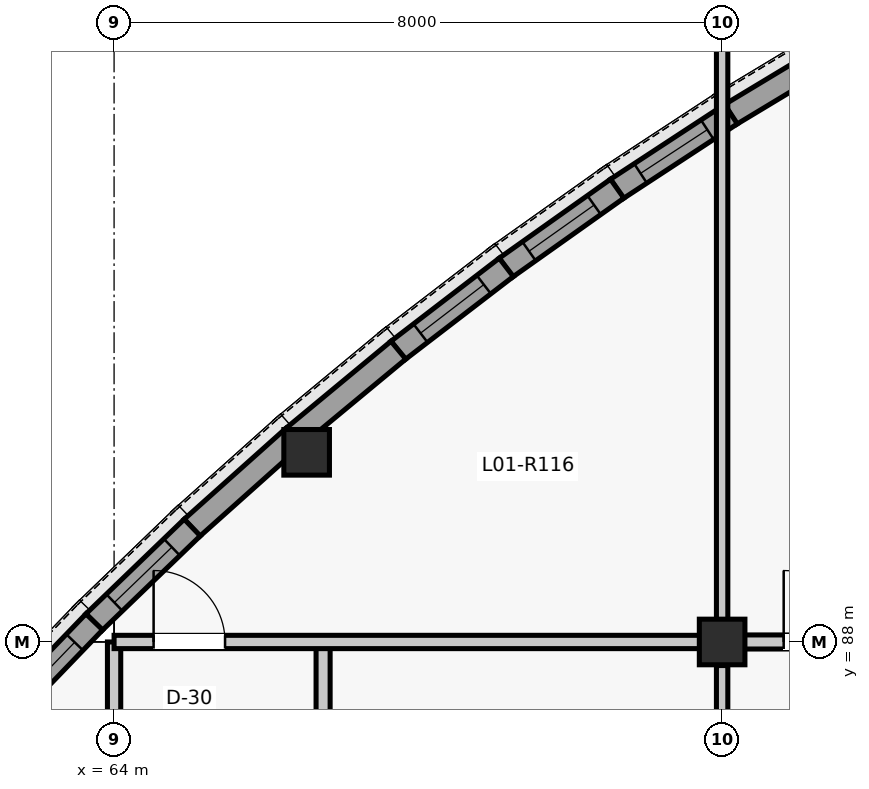
"""IFC4 building model, lengths in metres.
Left out: names, types, materials, properties, quantities, classifications, styles, units other than length and angle.
Written with IfcOpenShell. Run it as: python <this file> out.ifc"""

import sys

from ifc_helpers import new_model, si_unit, direction, frame, frame_2d, origin, origin_2d, place, context, subcontext, project, spatial, rectangle, extrude, element, fill, save


model = new_model("IFC4")
c1 = context("Model", 3, precision=1e-05, world=origin(), true_north=direction((0.0, 1.0)))
c2 = subcontext(c1, "Body", "Model", "MODEL_VIEW")
j1 = project(units=[si_unit("LENGTHUNIT", "METRE"), si_unit("PLANEANGLEUNIT", "RADIAN")], contexts=[c1])
p1 = place(None, origin())
s1 = spatial("IfcSite", under=j1, at=p1, CompositionType="ELEMENT")
p2 = place(p1, origin())
s2 = spatial("IfcBuilding", under=s1, at=p2, CompositionType="ELEMENT")
p3 = place(p2, frame((0.0, 0.0, 5.28)))
s3 = spatial("IfcBuildingStorey", under=s2, at=p3, CompositionType="ELEMENT", Elevation=5.28)
for number, where, z_axis, x_axis in (
    (1, (72.0, 88.0, 0.0), (0.0, 0.0, 1.0), (1.0, 0.0, 0.0)),
    (2, (66.533, 90.495, 0.0), (0.0, 0.0, 1.0), (1.0, 0.0, 0.0)),
):
    element("IfcColumn", number, at=place(p3, frame(where, z_axis=z_axis, x_axis=x_axis)), inside=s3, PredefinedType="COLUMN", context=c2, shape_type="SweptSolid", body=[
        extrude(rectangle(XDim=0.6, YDim=0.6, at=origin_2d()), origin(), (0.0, 0.0, 1.0), 4.62),
    ])
p4 = place(p3, frame((73.649, 95.867, 0.0), z_axis=(0.0, 0.0, 1.0), x_axis=(-0.856543302071, -0.51607516088, 0.0)))
e3 = element("IfcWall", 3, at=p4, inside=s3, PredefinedType="SOLIDWALL", context=c2, shape_type="SweptSolid", body=[
    extrude(rectangle(XDim=1.795, YDim=0.305, at=frame_2d((0.897, 0.0))), origin(), (0.0, 0.0, 1.0), 4.335),
])
p5 = place(p3, frame((72.117, 94.944, 0.0), z_axis=(0.0, 0.0, 1.0), x_axis=(-0.836686786408, -0.547681678944, 0.0)))
e4 = element("IfcWall", 4, at=p5, inside=s3, PredefinedType="SOLIDWALL", context=c2, shape_type="SweptSolid", body=[
    extrude(rectangle(XDim=1.795, YDim=0.305, at=frame_2d((0.897, 0.0))), origin(), (0.0, 0.0, 1.0), 4.335),
])
p6 = place(p5, frame((0.373, 0.0, 0.9)))
e5 = element("IfcOpeningElement", 5, at=p6, cuts=e4, PredefinedType="OPENING", context=c2, shape_type="SweptSolid", body=[
    extrude(rectangle(XDim=1.05, YDim=1.85, at=frame_2d((0.525, 0.925))), frame((0.0, 0.162, 0.0), z_axis=(0.0, -1.0, 0.0), x_axis=(1.0, 0.0, 0.0)), (0.0, 0.0, 1.0), 0.325),
])
p7 = place(p3, frame((70.62, 93.964, 0.0), z_axis=(0.0, 0.0, 1.0), x_axis=(-0.815567185578, -0.578662393636, 0.0)))
e6 = element("IfcWall", 6, at=p7, inside=s3, PredefinedType="SOLIDWALL", context=c2, shape_type="SweptSolid", body=[
    extrude(rectangle(XDim=1.795, YDim=0.305, at=frame_2d((0.897, 0.0))), origin(), (0.0, 0.0, 1.0), 4.335),
])
p8 = place(p7, frame((0.373, 0.0, 0.9)))
e7 = element("IfcOpeningElement", 7, at=p8, cuts=e6, PredefinedType="OPENING", context=c2, shape_type="SweptSolid", body=[
    extrude(rectangle(XDim=1.05, YDim=1.85, at=frame_2d((0.525, 0.925))), frame((0.0, 0.162, 0.0), z_axis=(0.0, -1.0, 0.0), x_axis=(1.0, 0.0, 0.0)), (0.0, 0.0, 1.0), 0.325),
])
p9 = place(p3, frame((69.16, 92.928, 0.0), z_axis=(0.0, 0.0, 1.0), x_axis=(-0.793341406114, -0.608776981616, 0.0)))
e8 = element("IfcWall", 8, at=p9, inside=s3, PredefinedType="SOLIDWALL", context=c2, shape_type="SweptSolid", body=[
    extrude(rectangle(XDim=1.795, YDim=0.305, at=frame_2d((0.897, 0.0))), origin(), (0.0, 0.0, 1.0), 4.335),
])
p10 = place(p9, frame((0.373, 0.0, 0.9)))
e9 = element("IfcOpeningElement", 9, at=p10, cuts=e8, PredefinedType="OPENING", context=c2, shape_type="SweptSolid", body=[
    extrude(rectangle(XDim=1.05, YDim=1.85, at=frame_2d((0.525, 0.925))), frame((0.0, 0.162, 0.0), z_axis=(0.0, -1.0, 0.0), x_axis=(1.0, 0.0, 0.0)), (0.0, 0.0, 1.0), 0.325),
])
p11 = place(p3, frame((67.74, 91.839, 0.0), z_axis=(0.0, 0.0, 1.0), x_axis=(-0.769991012207, -0.638054732073, 0.0)))
e10 = element("IfcWall", 10, at=p11, inside=s3, PredefinedType="SOLIDWALL", context=c2, shape_type="SweptSolid", body=[
    extrude(rectangle(XDim=1.795, YDim=0.305, at=frame_2d((0.897, 0.0))), origin(), (0.0, 0.0, 1.0), 4.335),
])
p12 = place(p3, frame((66.363, 90.698, 0.0), z_axis=(0.0, 0.0, 1.0), x_axis=(-0.745703543965, -0.666277888361, 0.0)))
e11 = element("IfcWall", 11, at=p12, inside=s3, PredefinedType="SOLIDWALL", context=c2, shape_type="SweptSolid", body=[
    extrude(rectangle(XDim=1.795, YDim=0.305, at=frame_2d((0.897, 0.0))), origin(), (0.0, 0.0, 1.0), 4.335),
])
p13 = place(p3, frame((65.029, 89.506, 0.0), z_axis=(0.0, 0.0, 1.0), x_axis=(-0.720242191926, -0.693722700342, 0.0)))
e12 = element("IfcWall", 12, at=p13, inside=s3, PredefinedType="SOLIDWALL", context=c2, shape_type="SweptSolid", body=[
    extrude(rectangle(XDim=1.795, YDim=0.305, at=frame_2d((0.897, 0.0))), origin(), (0.0, 0.0, 1.0), 4.335),
])
p14 = place(p13, frame((0.373, 0.0, 0.9)))
e13 = element("IfcOpeningElement", 13, at=p14, cuts=e12, PredefinedType="OPENING", context=c2, shape_type="SweptSolid", body=[
    extrude(rectangle(XDim=1.05, YDim=1.85, at=frame_2d((0.525, 0.925))), frame((0.0, 0.162, 0.0), z_axis=(0.0, -1.0, 0.0), x_axis=(1.0, 0.0, 0.0)), (0.0, 0.0, 1.0), 0.325),
])
p15 = place(p3, frame((63.74, 88.264, 0.0), z_axis=(0.0, 0.0, 1.0), x_axis=(-0.693722700342, -0.720242191926, 0.0)))
e14 = element("IfcWall", 14, at=p15, inside=s3, PredefinedType="SOLIDWALL", context=c2, shape_type="SweptSolid", body=[
    extrude(rectangle(XDim=1.795, YDim=0.305, at=frame_2d((0.897, 0.0))), origin(), (0.0, 0.0, 1.0), 4.335),
])
p16 = place(p15, frame((0.373, 0.0, 0.9)))
e15 = element("IfcOpeningElement", 15, at=p16, cuts=e14, PredefinedType="OPENING", context=c2, shape_type="SweptSolid", body=[
    extrude(rectangle(XDim=1.05, YDim=1.85, at=frame_2d((0.525, 0.925))), frame((0.0, 0.162, 0.0), z_axis=(0.0, -1.0, 0.0), x_axis=(1.0, 0.0, 0.0)), (0.0, 0.0, 1.0), 0.325),
])
p17 = place(p3, frame((66.75, 82.7, 0.0), z_axis=(0.0, 0.0, 1.0), x_axis=(0.0, 1.0, 0.0)))
e16 = element("IfcWall", 16, at=p17, inside=s3, PredefinedType="PARTITIONING", context=c2, shape_type="SweptSolid", body=[
    extrude(rectangle(XDim=5.28, YDim=0.185, at=frame_2d((2.64, 0.0))), origin(), (0.0, 0.0, 1.0), 4.325),
])
p18 = place(p3, frame((72.0, 82.75, 0.0), z_axis=(0.0, 0.0, 1.0), x_axis=(0.0, 1.0, 0.0)))
e17 = element("IfcWall", 17, at=p18, inside=s3, PredefinedType="PARTITIONING", context=c2, shape_type="SweptSolid", body=[
    extrude(rectangle(XDim=4.94, YDim=0.15, at=frame_2d((2.47, 0.0))), origin(), (0.0, 0.0, 1.0), 3.896),
])
p19 = place(p3, frame((64.0, 80.29, 0.0), z_axis=(0.0, 0.0, 1.0), x_axis=(0.0, 1.0, 0.0)))
e18 = element("IfcWall", 18, at=p19, inside=s3, PredefinedType="PARTITIONING", context=c2, shape_type="SweptSolid", body=[
    extrude(rectangle(XDim=7.71, YDim=0.175, at=frame_2d((3.855, 0.0))), origin(), (0.0, 0.0, 1.0), 4.325),
])
p20 = place(p19, frame((3.395, 0.0, 0.0)))
e19 = element("IfcOpeningElement", 19, at=p20, cuts=e18, PredefinedType="OPENING", context=c2, shape_type="SweptSolid", body=[
    extrude(rectangle(XDim=0.92, YDim=2.1, at=frame_2d((0.46, 1.05))), frame((0.0, 0.097, 0.0), z_axis=(0.0, -1.0, 0.0), x_axis=(1.0, 0.0, 0.0)), (0.0, 0.0, 1.0), 0.195),
])
p21 = place(p3, frame((64.0, 88.0, 0.0), z_axis=(0.0, 0.0, 1.0), x_axis=(1.0, 0.0, 0.0)))
e20 = element("IfcWall", 20, at=p21, inside=s3, PredefinedType="PARTITIONING", context=c2, shape_type="SweptSolid", body=[
    extrude(rectangle(XDim=7.71, YDim=0.175, at=frame_2d((3.855, 0.0))), origin(), (0.0, 0.0, 1.0), 4.325),
])
p22 = place(p21, frame((0.52, 0.0, 0.0)))
e21 = element("IfcOpeningElement", 21, at=p22, cuts=e20, PredefinedType="OPENING", context=c2, shape_type="SweptSolid", body=[
    extrude(rectangle(XDim=0.94, YDim=2.12, at=frame_2d((0.47, 1.06))), frame((0.0, 0.097, 0.0), z_axis=(0.0, -1.0, 0.0), x_axis=(1.0, 0.0, 0.0)), (0.0, 0.0, 1.0), 0.195),
])
p23 = place(p3, frame((72.0, 88.29, 0.0), z_axis=(0.0, 0.0, 1.0), x_axis=(0.0, 1.0, 0.0)))
e22 = element("IfcWall", 22, at=p23, inside=s3, PredefinedType="PARTITIONING", context=c2, shape_type="SweptSolid", body=[
    extrude(rectangle(XDim=7.71, YDim=0.15, at=frame_2d((3.855, 0.0))), origin(), (0.0, 0.0, 1.0), 4.325),
])
p24 = place(p3, frame((72.29, 88.0, 0.0), z_axis=(0.0, 0.0, 1.0), x_axis=(1.0, 0.0, 0.0)))
e23 = element("IfcWall", 23, at=p24, inside=s3, PredefinedType="PARTITIONING", context=c2, shape_type="SweptSolid", body=[
    extrude(rectangle(XDim=7.42, YDim=0.185, at=frame_2d((3.71, 0.0))), origin(), (0.0, 0.0, 1.0), 3.757),
])
p25 = place(p24, frame((0.52, 0.0, 0.0)))
e24 = element("IfcOpeningElement", 24, at=p25, cuts=e23, PredefinedType="OPENING", context=c2, shape_type="SweptSolid", body=[
    extrude(rectangle(XDim=0.94, YDim=2.12, at=frame_2d((0.47, 1.06))), frame((0.0, 0.103, 0.0), z_axis=(0.0, -1.0, 0.0), x_axis=(1.0, 0.0, 0.0)), (0.0, 0.0, 1.0), 0.205),
])
p26 = place(p6, origin())
e25 = element("IfcWindow", 25, at=p26, inside=s3, PartitioningType="SINGLE_PANEL", PredefinedType="WINDOW", context=c2, shape_type="SweptSolid", body=[
    extrude(rectangle(XDim=1.05, YDim=1.85, at=frame_2d((0.525, 0.925))), frame((0.0, 0.03, 0.0), z_axis=(0.0, -1.0, 0.0), x_axis=(1.0, 0.0, 0.0)), (0.0, 0.0, 1.0), 0.06),
])
fill(e5, e25)
p27 = place(p8, origin())
e26 = element("IfcWindow", 26, at=p27, inside=s3, PartitioningType="SINGLE_PANEL", PredefinedType="WINDOW", context=c2, shape_type="SweptSolid", body=[
    extrude(rectangle(XDim=1.05, YDim=1.85, at=frame_2d((0.525, 0.925))), frame((0.0, 0.03, 0.0), z_axis=(0.0, -1.0, 0.0), x_axis=(1.0, 0.0, 0.0)), (0.0, 0.0, 1.0), 0.06),
])
fill(e7, e26)
p28 = place(p10, origin())
e27 = element("IfcWindow", 27, at=p28, inside=s3, PartitioningType="SINGLE_PANEL", PredefinedType="WINDOW", context=c2, shape_type="SweptSolid", body=[
    extrude(rectangle(XDim=1.05, YDim=1.85, at=frame_2d((0.525, 0.925))), frame((0.0, 0.03, 0.0), z_axis=(0.0, -1.0, 0.0), x_axis=(1.0, 0.0, 0.0)), (0.0, 0.0, 1.0), 0.06),
])
fill(e9, e27)
p29 = place(p14, origin())
e28 = element("IfcWindow", 28, at=p29, inside=s3, PartitioningType="SINGLE_PANEL", PredefinedType="WINDOW", context=c2, shape_type="SweptSolid", body=[
    extrude(rectangle(XDim=1.05, YDim=1.85, at=frame_2d((0.525, 0.925))), frame((0.0, 0.03, 0.0), z_axis=(0.0, -1.0, 0.0), x_axis=(1.0, 0.0, 0.0)), (0.0, 0.0, 1.0), 0.06),
])
fill(e13, e28)
p30 = place(p16, origin())
e29 = element("IfcWindow", 29, at=p30, inside=s3, PartitioningType="SINGLE_PANEL", PredefinedType="WINDOW", context=c2, shape_type="SweptSolid", body=[
    extrude(rectangle(XDim=1.05, YDim=1.85, at=frame_2d((0.525, 0.925))), frame((0.0, 0.03, 0.0), z_axis=(0.0, -1.0, 0.0), x_axis=(1.0, 0.0, 0.0)), (0.0, 0.0, 1.0), 0.06),
])
fill(e15, e29)
p31 = place(p22, origin())
e30 = element("IfcDoor", 30, at=p31, inside=s3, OperationType="SINGLE_SWING_LEFT", PredefinedType="DOOR", context=c2, shape_type="SweptSolid", body=[
    extrude(rectangle(XDim=0.94, YDim=2.12, at=frame_2d((0.47, 1.06))), frame((0.0, 0.025, 0.0), z_axis=(0.0, -1.0, 0.0), x_axis=(1.0, 0.0, 0.0)), (0.0, 0.0, 1.0), 0.05),
])
fill(e21, e30)
p32 = place(p25, origin())
e31 = element("IfcDoor", 31, at=p32, inside=s3, OperationType="SINGLE_SWING_LEFT", PredefinedType="DOOR", context=c2, shape_type="SweptSolid", body=[
    extrude(rectangle(XDim=0.94, YDim=2.12, at=frame_2d((0.47, 1.06))), frame((0.0, 0.025, 0.0), z_axis=(0.0, -1.0, 0.0), x_axis=(1.0, 0.0, 0.0)), (0.0, 0.0, 1.0), 0.05),
])
fill(e24, e31)
save(model, sys.argv[1])
